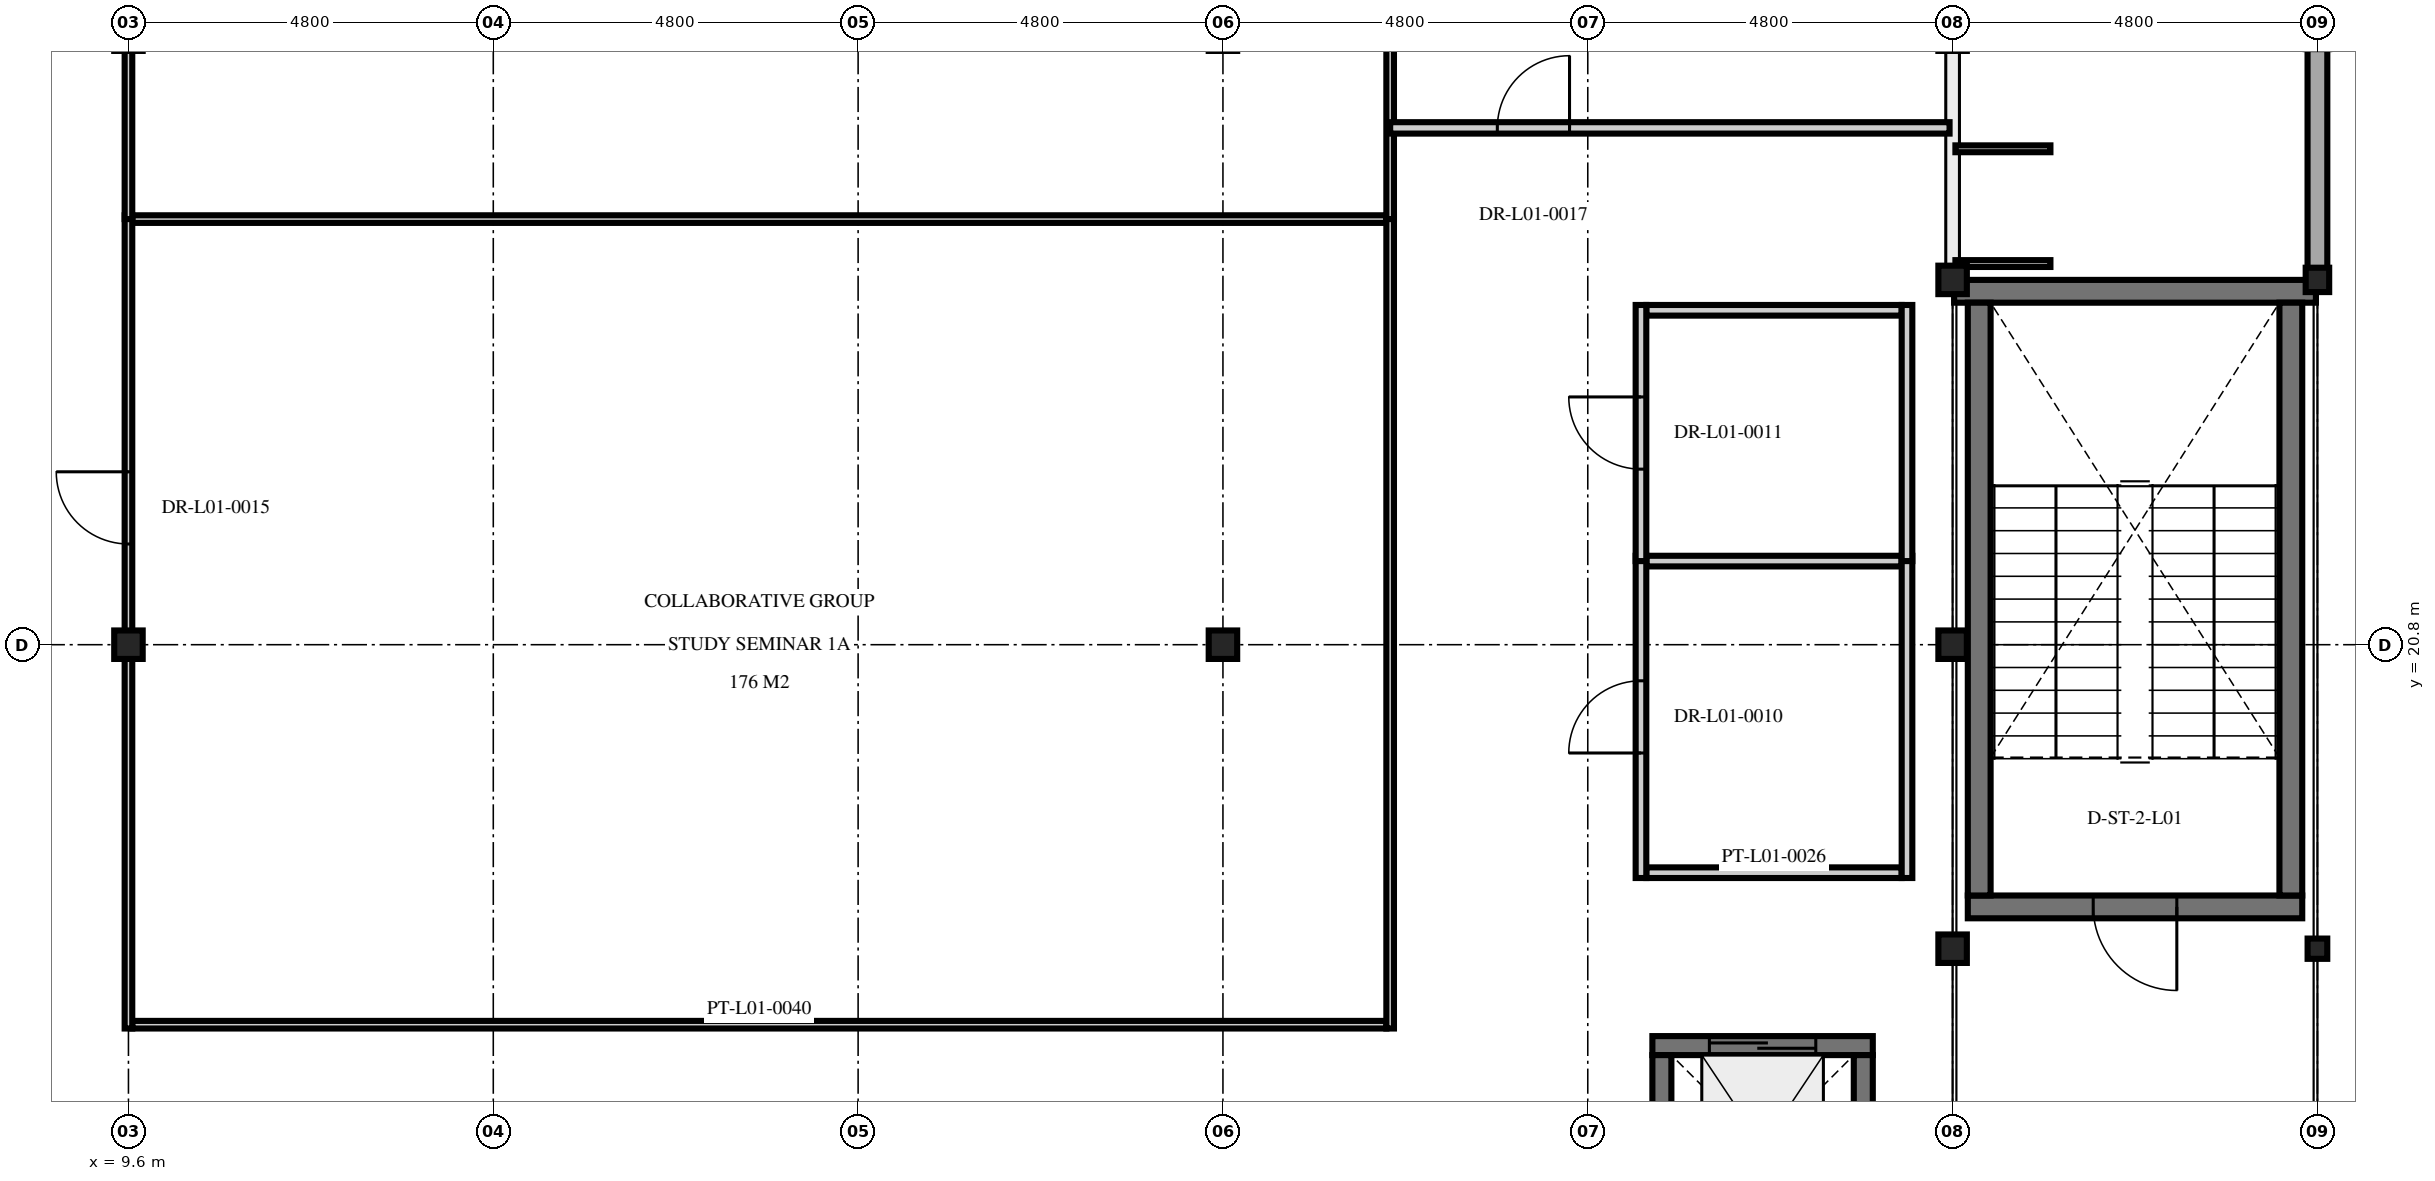
"""IFC4 building model, lengths in metres.
Left out: names, types, materials, properties, quantities, classifications, styles, units other than length and angle.
Written with IfcOpenShell. Run it as: python <this file> out.ifc"""

import sys

from ifc_helpers import new_model, si_unit, direction, frame, frame_2d, origin, origin_2d, place, context, subcontext, project, spatial, rectangle, i_section, extrude, element, fill, save


model = new_model("IFC4")
c1 = context("Model", 3, precision=1e-05, world=origin(), true_north=direction((0.0, 1.0)))
c2 = subcontext(c1, "Body", "Model", "MODEL_VIEW")
j1 = project(units=[si_unit("LENGTHUNIT", "METRE"), si_unit("PLANEANGLEUNIT", "RADIAN")], contexts=[c1])
p1 = place(None, origin())
s1 = spatial("IfcSite", under=j1, at=p1, CompositionType="ELEMENT")
p2 = place(p1, origin())
s2 = spatial("IfcBuilding", under=s1, at=p2, CompositionType="ELEMENT")
p3 = place(p2, frame((0.0, 0.0, 5.1)))
s3 = spatial("IfcBuildingStorey", under=s2, at=p3, CompositionType="ELEMENT", Elevation=5.1)
for number, where, z_axis, x_axis in (
    (1, (33.6, 16.8, 0.0), (0.0, 0.0, 1.0), (1.0, 0.0, 0.0)),
    (2, (33.6, 20.8, 0.0), (0.0, 0.0, 1.0), (1.0, 0.0, 0.0)),
    (3, (33.6, 25.6, 0.0), (0.0, 0.0, 1.0), (1.0, 0.0, 0.0)),
    (4, (9.6, 20.8, 0.0), (0.0, 0.0, 1.0), (1.0, 0.0, 0.0)),
    (5, (24.0, 20.8, 0.0), (0.0, 0.0, 1.0), (1.0, 0.0, 0.0)),
):
    element("IfcColumn", number, at=place(p3, frame(where, z_axis=z_axis, x_axis=x_axis)), inside=s3, PredefinedType="COLUMN", context=c2, shape_type="SweptSolid", body=[
        extrude(i_section(OverallWidth=0.375, OverallDepth=0.375, WebThickness=0.017, FlangeThickness=0.027, at=origin_2d()), origin(), (0.0, 0.0, 1.0), 4.5),
    ])
p4 = place(p3, frame((38.4, 25.6, 0.0), z_axis=(0.0, 0.0, 1.0), x_axis=(1.0, 0.0, 0.0)))
e6 = element("IfcColumn", 6, at=p4, inside=s3, PredefinedType="COLUMN", context=c2, shape_type="SweptSolid", body=[
    extrude(i_section(OverallWidth=0.309, OverallDepth=0.321, WebThickness=0.014, FlangeThickness=0.022, at=origin_2d()), origin(), (0.0, 0.0, 1.0), 4.5),
])
p5 = place(p3, frame((38.4, 16.8, 0.0), z_axis=(0.0, 0.0, 1.0), x_axis=(1.0, 0.0, 0.0)))
e7 = element("IfcColumn", 7, at=p5, inside=s3, PredefinedType="COLUMN", context=c2, shape_type="SweptSolid", body=[
    extrude(i_section(OverallWidth=0.259, OverallDepth=0.267, WebThickness=0.013, FlangeThickness=0.021, at=origin_2d()), origin(), (0.0, 0.0, 1.0), 4.5),
])
p6 = place(p3, frame((38.2, 17.35, 0.0), z_axis=(0.0, 0.0, 1.0), x_axis=(-1.0, 0.0, 0.0)))
e8 = element("IfcWall", 8, at=p6, inside=s3, PredefinedType="SHEAR", context=c2, shape_type="SweptSolid", body=[
    extrude(rectangle(XDim=4.4, YDim=0.3, at=frame_2d((2.2, 0.0))), origin(), (0.0, 0.0, 1.0), 4.29),
])
p7 = place(p6, frame((1.65, 0.0, 0.0)))
e9 = element("IfcOpeningElement", 9, at=p7, cuts=e8, PredefinedType="OPENING", context=c2, shape_type="SweptSolid", body=[
    extrude(rectangle(XDim=1.1, YDim=2.2, at=frame_2d((0.55, 1.1))), frame((0.0, 0.16, 0.0), z_axis=(0.0, -1.0, 0.0), x_axis=(1.0, 0.0, 0.0)), (0.0, 0.0, 1.0), 0.32),
])
p8 = place(p3, frame((33.62, 25.45, 0.0), z_axis=(0.0, 0.0, 1.0), x_axis=(1.0, 0.0, 0.0)))
e10 = element("IfcWall", 10, at=p8, inside=s3, PredefinedType="SHEAR", context=c2, shape_type="SweptSolid", body=[
    extrude(rectangle(XDim=4.76, YDim=0.3, at=frame_2d((2.38, 0.0))), origin(), (0.0, 0.0, 1.0), 4.29),
])
for number, where, z_axis, x_axis in (
    (11, (33.95, 17.5, 0.0), (0.0, 0.0, 1.0), (0.0, 1.0, 0.0)),
    (12, (38.05, 25.3, 0.0), (0.0, 0.0, 1.0), (0.0, -1.0, 0.0)),
):
    element("IfcWall", number, at=place(p3, frame(where, z_axis=z_axis, x_axis=x_axis)), inside=s3, PredefinedType="SHEAR", context=c2, shape_type="SweptSolid", body=[
        extrude(rectangle(XDim=7.8, YDim=0.3, at=frame_2d((3.9, 0.0))), origin(), (0.0, 0.0, 1.0), 4.29),
    ])
p9 = place(p3, frame((29.65, 15.525, 0.0), z_axis=(0.0, 0.0, 1.0), x_axis=(1.0, 0.0, 0.0)))
e13 = element("IfcWall", 13, at=p9, inside=s3, PredefinedType="SHEAR", context=c2, shape_type="SweptSolid", body=[
    extrude(rectangle(XDim=2.9, YDim=0.25, at=frame_2d((1.45, 0.0))), origin(), (0.0, 0.0, 1.0), 4.29),
])
p10 = place(p9, frame((0.75, 0.0, 0.0)))
e14 = element("IfcOpeningElement", 14, at=p10, cuts=e13, PredefinedType="OPENING", context=c2, shape_type="SweptSolid", body=[
    extrude(rectangle(XDim=1.4, YDim=2.2, at=frame_2d((0.7, 1.1))), frame((0.0, 0.135, 0.0), z_axis=(0.0, -1.0, 0.0), x_axis=(1.0, 0.0, 0.0)), (0.0, 0.0, 1.0), 0.27),
])
for number, where, z_axis, x_axis in (
    (15, (29.775, 13.0, 0.0), (0.0, 0.0, 1.0), (0.0, 1.0, 0.0)),
    (16, (32.425, 15.4, 0.0), (0.0, 0.0, 1.0), (0.0, -1.0, 0.0)),
):
    element("IfcWall", number, at=place(p3, frame(where, z_axis=z_axis, x_axis=x_axis)), inside=s3, PredefinedType="SHEAR", context=c2, shape_type="SweptSolid", body=[
        extrude(rectangle(XDim=2.4, YDim=0.25, at=frame_2d((1.2, 0.0))), origin(), (0.0, 0.0, 1.0), 4.29),
    ])
p11 = place(p3, frame((38.4, 25.515, 0.0), z_axis=(0.0, 0.0, 1.0), x_axis=(0.0, 1.0, 0.0)))
e17 = element("IfcWall", 17, at=p11, inside=s3, PredefinedType="SOLIDWALL", context=c2, shape_type="SweptSolid", body=[
    extrude(rectangle(XDim=11.37, YDim=0.26, at=frame_2d((5.685, 0.0))), origin(), (0.0, 0.0, 1.0), 3.765),
])
for number, where, z_axis, x_axis in (
    (18, (29.57, 17.8, 0.0), (0.0, 0.0, 1.0), (1.0, 0.0, 0.0)),
    (19, (29.57, 21.9, 0.0), (0.0, 0.0, 1.0), (1.0, 0.0, 0.0)),
):
    element("IfcWall", number, at=place(p3, frame(where, z_axis=z_axis, x_axis=x_axis)), inside=s3, PredefinedType="PARTITIONING", context=c2, shape_type="SweptSolid", body=[
        extrude(rectangle(XDim=3.36, YDim=0.14, at=frame_2d((1.68, 0.0))), origin(), (0.0, 0.0, 1.0), 4.045),
    ])
p12 = place(p3, frame((29.5, 17.73, 0.0), z_axis=(0.0, 0.0, 1.0), x_axis=(0.0, 1.0, 0.0)))
e20 = element("IfcWall", 20, at=p12, inside=s3, PredefinedType="PARTITIONING", context=c2, shape_type="SweptSolid", body=[
    extrude(rectangle(XDim=4.24, YDim=0.14, at=frame_2d((2.12, 0.0))), origin(), (0.0, 0.0, 1.0), 3.765),
])
p13 = place(p12, frame((1.645, 0.0, 0.0)))
e21 = element("IfcOpeningElement", 21, at=p13, cuts=e20, PredefinedType="OPENING", context=c2, shape_type="SweptSolid", body=[
    extrude(rectangle(XDim=0.95, YDim=2.1, at=frame_2d((0.475, 1.05))), frame((0.0, 0.08, 0.0), z_axis=(0.0, -1.0, 0.0), x_axis=(1.0, 0.0, 0.0)), (0.0, 0.0, 1.0), 0.16),
])
p14 = place(p3, frame((33.0, 17.73, 0.0), z_axis=(0.0, 0.0, 1.0), x_axis=(0.0, 1.0, 0.0)))
e22 = element("IfcWall", 22, at=p14, inside=s3, PredefinedType="PARTITIONING", context=c2, shape_type="SweptSolid", body=[
    extrude(rectangle(XDim=4.24, YDim=0.14, at=frame_2d((2.12, 0.0))), origin(), (0.0, 0.0, 1.0), 3.765),
])
p15 = place(p3, frame((29.57, 25.2, 0.0), z_axis=(0.0, 0.0, 1.0), x_axis=(1.0, 0.0, 0.0)))
e23 = element("IfcWall", 23, at=p15, inside=s3, PredefinedType="PARTITIONING", context=c2, shape_type="SweptSolid", body=[
    extrude(rectangle(XDim=3.36, YDim=0.14, at=frame_2d((1.68, 0.0))), origin(), (0.0, 0.0, 1.0), 4.045),
])
p16 = place(p3, frame((29.5, 21.9, 0.0), z_axis=(0.0, 0.0, 1.0), x_axis=(0.0, 1.0, 0.0)))
e24 = element("IfcWall", 24, at=p16, inside=s3, PredefinedType="PARTITIONING", context=c2, shape_type="SweptSolid", body=[
    extrude(rectangle(XDim=3.37, YDim=0.14, at=frame_2d((1.685, 0.0))), origin(), (0.0, 0.0, 1.0), 4.29),
])
p17 = place(p16, frame((1.21, 0.0, 0.0)))
e25 = element("IfcOpeningElement", 25, at=p17, cuts=e24, PredefinedType="OPENING", context=c2, shape_type="SweptSolid", body=[
    extrude(rectangle(XDim=0.95, YDim=2.1, at=frame_2d((0.475, 1.05))), frame((0.0, 0.08, 0.0), z_axis=(0.0, -1.0, 0.0), x_axis=(1.0, 0.0, 0.0)), (0.0, 0.0, 1.0), 0.16),
])
p18 = place(p3, frame((33.0, 21.9, 0.0), z_axis=(0.0, 0.0, 1.0), x_axis=(0.0, 1.0, 0.0)))
e26 = element("IfcWall", 26, at=p18, inside=s3, PredefinedType="PARTITIONING", context=c2, shape_type="SweptSolid", body=[
    extrude(rectangle(XDim=3.37, YDim=0.14, at=frame_2d((1.685, 0.0))), origin(), (0.0, 0.0, 1.0), 4.29),
])
for number, where, z_axis, x_axis in (
    (27, (9.65, 15.8, 0.0), (0.0, 0.0, 1.0), (1.0, 0.0, 0.0)),
    (28, (9.65, 26.4, 0.0), (0.0, 0.0, 1.0), (1.0, 0.0, 0.0)),
):
    element("IfcWall", number, at=place(p3, frame(where, z_axis=z_axis, x_axis=x_axis)), inside=s3, PredefinedType="MOVABLE", context=c2, shape_type="SweptSolid", body=[
        extrude(rectangle(XDim=16.5, YDim=0.1, at=frame_2d((8.25, 0.0))), origin(), (0.0, 0.0, 1.0), 3.852),
    ])
p19 = place(p3, frame((9.6, 15.75, 0.0), z_axis=(0.0, 0.0, 1.0), x_axis=(0.0, 1.0, 0.0)))
e29 = element("IfcWall", 29, at=p19, inside=s3, PredefinedType="MOVABLE", context=c2, shape_type="SweptSolid", body=[
    extrude(rectangle(XDim=10.7, YDim=0.1, at=frame_2d((5.35, 0.0))), origin(), (0.0, 0.0, 1.0), 3.765),
])
p20 = place(p19, frame((6.375, 0.0, 0.0)))
e30 = element("IfcOpeningElement", 30, at=p20, cuts=e29, PredefinedType="OPENING", context=c2, shape_type="SweptSolid", body=[
    extrude(rectangle(XDim=0.95, YDim=2.15, at=frame_2d((0.475, 1.075))), frame((0.0, 0.06, 0.0), z_axis=(0.0, -1.0, 0.0), x_axis=(1.0, 0.0, 0.0)), (0.0, 0.0, 1.0), 0.12),
])
p21 = place(p3, frame((26.2, 15.75, 0.0), z_axis=(0.0, 0.0, 1.0), x_axis=(0.0, 1.0, 0.0)))
e31 = element("IfcWall", 31, at=p21, inside=s3, PredefinedType="MOVABLE", context=c2, shape_type="SweptSolid", body=[
    extrude(rectangle(XDim=10.7, YDim=0.1, at=frame_2d((5.35, 0.0))), origin(), (0.0, 0.0, 1.0), 3.765),
])
p22 = place(p3, frame((9.6, 26.4, 0.0), z_axis=(0.0, 0.0, 1.0), x_axis=(0.0, 1.0, 0.0)))
e32 = element("IfcWall", 32, at=p22, inside=s3, PredefinedType="MOVABLE", context=c2, shape_type="SweptSolid", body=[
    extrude(rectangle(XDim=10.36, YDim=0.1, at=frame_2d((5.18, 0.0))), origin(), (0.0, 0.0, 1.0), 3.765),
])
p23 = place(p22, frame((4.705, 0.0, 0.0)))
e33 = element("IfcOpeningElement", 33, at=p23, cuts=e32, PredefinedType="OPENING", context=c2, shape_type="SweptSolid", body=[
    extrude(rectangle(XDim=0.95, YDim=2.15, at=frame_2d((0.475, 1.075))), frame((0.0, 0.06, 0.0), z_axis=(0.0, -1.0, 0.0), x_axis=(1.0, 0.0, 0.0)), (0.0, 0.0, 1.0), 0.12),
])
p24 = place(p3, frame((26.2, 26.4, 0.0), z_axis=(0.0, 0.0, 1.0), x_axis=(0.0, 1.0, 0.0)))
e34 = element("IfcWall", 34, at=p24, inside=s3, PredefinedType="MOVABLE", context=c2, shape_type="SweptSolid", body=[
    extrude(rectangle(XDim=10.36, YDim=0.1, at=frame_2d((5.18, 0.0))), origin(), (0.0, 0.0, 1.0), 3.765),
])
p25 = place(p3, frame((26.2, 27.6, 0.0), z_axis=(0.0, 0.0, 1.0), x_axis=(1.0, 0.0, 0.0)))
e35 = element("IfcWall", 35, at=p25, inside=s3, PredefinedType="PARTITIONING", context=c2, shape_type="SweptSolid", body=[
    extrude(rectangle(XDim=7.36, YDim=0.15, at=frame_2d((3.68, 0.0))), origin(), (0.0, 0.0, 1.0), 3.852),
])
p26 = place(p25, frame((1.41, 0.0, 0.0)))
e36 = element("IfcOpeningElement", 36, at=p26, cuts=e35, PredefinedType="OPENING", context=c2, shape_type="SweptSolid", body=[
    extrude(rectangle(XDim=0.95, YDim=2.15, at=frame_2d((0.475, 1.075))), frame((0.0, 0.085, 0.0), z_axis=(0.0, -1.0, 0.0), x_axis=(1.0, 0.0, 0.0)), (0.0, 0.0, 1.0), 0.17),
])
p27 = place(p7, origin())
e37 = element("IfcDoor", 37, at=p27, inside=s3, OperationType="SINGLE_SWING_LEFT", PredefinedType="DOOR", context=c2, shape_type="SweptSolid", body=[
    extrude(rectangle(XDim=1.1, YDim=2.2, at=frame_2d((0.55, 1.1))), frame((0.0, 0.025, 0.0), z_axis=(0.0, -1.0, 0.0), x_axis=(1.0, 0.0, 0.0)), (0.0, 0.0, 1.0), 0.05),
])
fill(e9, e37)
p28 = place(p10, origin())
e38 = element("IfcDoor", 38, at=p28, inside=s3, OperationType="DOUBLE_DOOR_SLIDING", PredefinedType="DOOR", context=c2, shape_type="SweptSolid", body=[
    extrude(rectangle(XDim=1.4, YDim=2.2, at=frame_2d((0.7, 1.1))), frame((0.0, 0.025, 0.0), z_axis=(0.0, -1.0, 0.0), x_axis=(1.0, 0.0, 0.0)), (0.0, 0.0, 1.0), 0.05),
])
fill(e14, e38)
p29 = place(p13, origin())
e39 = element("IfcDoor", 39, at=p29, inside=s3, OperationType="SINGLE_SWING_LEFT", PredefinedType="DOOR", context=c2, shape_type="SweptSolid", body=[
    extrude(rectangle(XDim=0.95, YDim=2.1, at=frame_2d((0.475, 1.05))), frame((0.0, 0.025, 0.0), z_axis=(0.0, -1.0, 0.0), x_axis=(1.0, 0.0, 0.0)), (0.0, 0.0, 1.0), 0.05),
])
fill(e21, e39)
p30 = place(p17, origin())
e40 = element("IfcDoor", 40, at=p30, inside=s3, OperationType="SINGLE_SWING_RIGHT", PredefinedType="DOOR", context=c2, shape_type="SweptSolid", body=[
    extrude(rectangle(XDim=0.95, YDim=2.1, at=frame_2d((0.475, 1.05))), frame((0.0, 0.025, 0.0), z_axis=(0.0, -1.0, 0.0), x_axis=(1.0, 0.0, 0.0)), (0.0, 0.0, 1.0), 0.05),
])
fill(e25, e40)
p31 = place(p20, origin())
e41 = element("IfcDoor", 41, at=p31, inside=s3, OperationType="SINGLE_SWING_RIGHT", PredefinedType="DOOR", context=c2, shape_type="SweptSolid", body=[
    extrude(rectangle(XDim=0.95, YDim=2.15, at=frame_2d((0.475, 1.075))), frame((0.0, 0.025, 0.0), z_axis=(0.0, -1.0, 0.0), x_axis=(1.0, 0.0, 0.0)), (0.0, 0.0, 1.0), 0.05),
])
fill(e30, e41)
p32 = place(p26, origin())
e42 = element("IfcDoor", 42, at=p32, inside=s3, OperationType="SINGLE_SWING_RIGHT", PredefinedType="DOOR", context=c2, shape_type="SweptSolid", body=[
    extrude(rectangle(XDim=0.95, YDim=2.15, at=frame_2d((0.475, 1.075))), frame((0.0, 0.025, 0.0), z_axis=(0.0, -1.0, 0.0), x_axis=(1.0, 0.0, 0.0)), (0.0, 0.0, 1.0), 0.05),
])
fill(e36, e42)
save(model, sys.argv[1])
